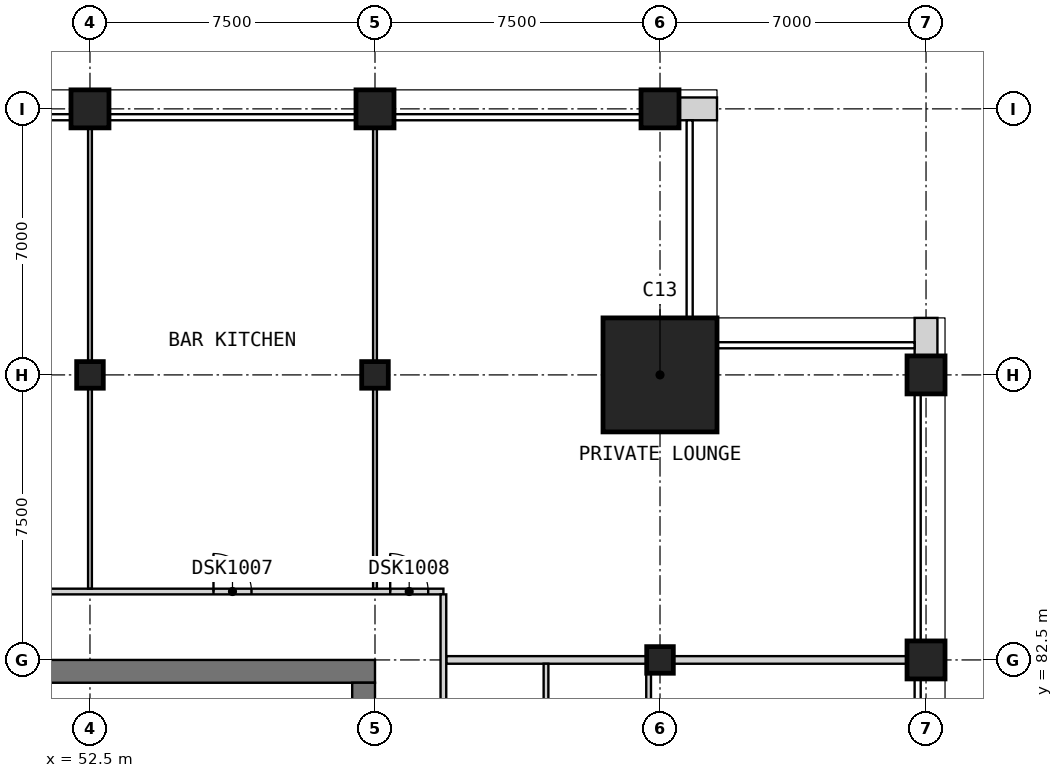
"""IFC4 building model, lengths in metres.
Left out: names, types, materials, properties, quantities, classifications, styles, units other than length and angle.
Written with IfcOpenShell. Run it as: python <this file> out.ifc"""

import sys

from ifc_helpers import new_model, si_unit, direction, frame, frame_2d, origin, origin_2d, place, context, subcontext, project, spatial, rectangle, extrude, element, fill, save


model = new_model("IFC4")
c1 = context("Model", 3, precision=1e-05, world=origin(), true_north=direction((0.0, 1.0)))
c2 = subcontext(c1, "Body", "Model", "MODEL_VIEW")
j1 = project(units=[si_unit("LENGTHUNIT", "METRE"), si_unit("PLANEANGLEUNIT", "RADIAN")], contexts=[c1])
p1 = place(None, origin())
s1 = spatial("IfcSite", under=j1, at=p1, CompositionType="ELEMENT")
p2 = place(p1, origin())
s2 = spatial("IfcBuilding", under=s1, at=p2, CompositionType="ELEMENT")
p3 = place(p2, frame((0.0, 0.0, 297.7)))
s3 = spatial("IfcBuildingStorey", under=s2, at=p3, CompositionType="ELEMENT", Elevation=297.7)
p4 = place(p3, frame((52.5, 90.0, 0.0), z_axis=(0.0, 0.0, 1.0), x_axis=(1.0, 0.0, 0.0)))
e1 = element("IfcColumn", 1, at=p4, inside=s3, PredefinedType="COLUMN", context=c2, shape_type="SweptSolid", body=[
    extrude(rectangle(XDim=0.7, YDim=0.7, at=origin_2d()), origin(), (0.0, 0.0, 1.0), 5.0),
])
p5 = place(p3, frame((52.5, 97.0, 0.0), z_axis=(0.0, 0.0, 1.0), x_axis=(1.0, 0.0, 0.0)))
e2 = element("IfcColumn", 2, at=p5, inside=s3, PredefinedType="COLUMN", context=c2, shape_type="SweptSolid", body=[
    extrude(rectangle(XDim=1.0, YDim=1.0, at=origin_2d()), origin(), (0.0, 0.0, 1.0), 5.0),
])
p6 = place(p3, frame((60.0, 90.0, 0.0), z_axis=(0.0, 0.0, 1.0), x_axis=(1.0, 0.0, 0.0)))
e3 = element("IfcColumn", 3, at=p6, inside=s3, PredefinedType="COLUMN", context=c2, shape_type="SweptSolid", body=[
    extrude(rectangle(XDim=0.7, YDim=0.7, at=origin_2d()), origin(), (0.0, 0.0, 1.0), 5.0),
])
p7 = place(p3, frame((60.0, 97.0, 0.0), z_axis=(0.0, 0.0, 1.0), x_axis=(1.0, 0.0, 0.0)))
e4 = element("IfcColumn", 4, at=p7, inside=s3, PredefinedType="COLUMN", context=c2, shape_type="SweptSolid", body=[
    extrude(rectangle(XDim=1.0, YDim=1.0, at=origin_2d()), origin(), (0.0, 0.0, 1.0), 5.0),
])
p8 = place(p3, frame((67.5, 82.5, 0.0), z_axis=(0.0, 0.0, 1.0), x_axis=(1.0, 0.0, 0.0)))
e5 = element("IfcColumn", 5, at=p8, inside=s3, PredefinedType="COLUMN", context=c2, shape_type="SweptSolid", body=[
    extrude(rectangle(XDim=0.7, YDim=0.7, at=origin_2d()), origin(), (0.0, 0.0, 1.0), 5.0),
])
for number, where, z_axis, x_axis in (
    (6, (67.5, 97.0, 0.0), (0.0, 0.0, 1.0), (1.0, 0.0, 0.0)),
    (7, (74.5, 82.5, 0.0), (0.0, 0.0, 1.0), (1.0, 0.0, 0.0)),
    (8, (74.5, 90.0, 0.0), (0.0, 0.0, 1.0), (1.0, 0.0, 0.0)),
):
    element("IfcColumn", number, at=place(p3, frame(where, z_axis=z_axis, x_axis=x_axis)), inside=s3, PredefinedType="COLUMN", context=c2, shape_type="SweptSolid", body=[
        extrude(rectangle(XDim=1.0, YDim=1.0, at=origin_2d()), origin(), (0.0, 0.0, 1.0), 5.0),
    ])
p9 = place(p3, frame((67.5, 90.0, 0.0), z_axis=(0.0, 0.0, 1.0), x_axis=(1.0, 0.0, 0.0)))
e9 = element("IfcColumn", 9, at=p9, inside=s3, PredefinedType="COLUMN", context=c2, shape_type="SweptSolid", body=[
    extrude(rectangle(XDim=3.0, YDim=3.0, at=origin_2d()), origin(), (0.0, 0.0, 1.0), 5.0),
])
p10 = place(p3, frame((30.0, 82.2, 0.0), z_axis=(0.0, 0.0, 1.0), x_axis=(1.0, 0.0, 0.0)))
e10 = element("IfcWall", 10, at=p10, inside=s3, PredefinedType="SHEAR", context=c2, shape_type="SweptSolid", body=[
    extrude(rectangle(XDim=30.0, YDim=0.6, at=frame_2d((15.0, 0.0))), origin(), (0.0, 0.0, 1.0), 5.0),
])
p11 = place(p3, frame((59.7, 60.6, 0.0), z_axis=(0.0, 0.0, 1.0), x_axis=(0.0, 1.0, 0.0)))
e11 = element("IfcWall", 11, at=p11, inside=s3, PredefinedType="SHEAR", context=c2, shape_type="SweptSolid", body=[
    extrude(rectangle(XDim=21.3, YDim=0.6, at=frame_2d((10.65, 0.0))), origin(), (0.0, 0.0, 1.0), 5.0),
])
p12 = place(p11, frame((14.9, 0.0, 0.0)))
e12 = element("IfcOpeningElement", 12, at=p12, cuts=e11, PredefinedType="OPENING", context=c2, shape_type="SweptSolid", body=[
    extrude(rectangle(XDim=1.8, YDim=2.1, at=frame_2d((0.9, 1.05))), frame((0.0, 0.31, 0.0), z_axis=(0.0, -1.0, 0.0), x_axis=(1.0, 0.0, 0.0)), (0.0, 0.0, 1.0), 0.62),
])
for number, where, z_axis, x_axis in (
    (13, (74.5, 90.5, 0.0), (0.0, 0.0, 1.0), (0.0, 1.0, 0.0)),
    (14, (69.0, 97.0, 0.0), (0.0, 0.0, 1.0), (-1.0, 0.0, 0.0)),
):
    element("IfcWall", number, at=place(p3, frame(where, z_axis=z_axis, x_axis=x_axis)), inside=s3, PredefinedType="SOLIDWALL", context=c2, shape_type="SweptSolid", body=[
        extrude(rectangle(XDim=1.0, YDim=0.6, at=frame_2d((0.5, 0.0))), origin(), (0.0, 0.0, 1.0), 4.7),
    ])
p13 = place(p3, frame((61.875, 82.5, 0.0), z_axis=(0.0, 0.0, 1.0), x_axis=(1.0, 0.0, 0.0)))
e15 = element("IfcWall", 15, at=p13, inside=s3, PredefinedType="PARTITIONING", context=c2, shape_type="SweptSolid", body=[
    extrude(rectangle(XDim=13.125, YDim=0.2, at=frame_2d((6.562, 0.0))), origin(), (0.0, 0.0, 1.0), 4.7),
])
p14 = place(p3, frame((33.75, 84.3, 0.0), z_axis=(0.0, 0.0, 1.0), x_axis=(1.0, 0.0, 0.0)))
e16 = element("IfcWall", 16, at=p14, inside=s3, PredefinedType="PARTITIONING", context=c2, shape_type="SweptSolid", body=[
    extrude(rectangle(XDim=28.05, YDim=0.15, at=frame_2d((14.025, 0.0))), origin(), (0.0, 0.0, 1.0), 4.7),
])
p15 = place(p14, frame((0.975, 0.0, 0.0)))
e17 = element("IfcOpeningElement", 17, at=p15, cuts=e16, PredefinedType="OPENING", context=c2, shape_type="SweptSolid", body=[
    extrude(rectangle(XDim=1.8, YDim=2.1, at=frame_2d((0.9, 1.05))), frame((0.0, 0.085, 0.0), z_axis=(0.0, -1.0, 0.0), x_axis=(1.0, 0.0, 0.0)), (0.0, 0.0, 1.0), 0.17),
])
p16 = place(p14, frame((10.35, 0.0, 0.0)))
e18 = element("IfcOpeningElement", 18, at=p16, cuts=e16, PredefinedType="OPENING", context=c2, shape_type="SweptSolid", body=[
    extrude(rectangle(XDim=1.8, YDim=2.1, at=frame_2d((0.9, 1.05))), frame((0.0, 0.085, 0.0), z_axis=(0.0, -1.0, 0.0), x_axis=(1.0, 0.0, 0.0)), (0.0, 0.0, 1.0), 0.17),
])
p17 = place(p14, frame((22.0, 0.0, 0.0)))
e19 = element("IfcOpeningElement", 19, at=p17, cuts=e16, PredefinedType="OPENING", context=c2, shape_type="SweptSolid", body=[
    extrude(rectangle(XDim=1.0, YDim=2.1, at=frame_2d((0.5, 1.05))), frame((0.0, 0.085, 0.0), z_axis=(0.0, -1.0, 0.0), x_axis=(1.0, 0.0, 0.0)), (0.0, 0.0, 1.0), 0.17),
])
p18 = place(p14, frame((26.65, 0.0, 0.0)))
e20 = element("IfcOpeningElement", 20, at=p18, cuts=e16, PredefinedType="OPENING", context=c2, shape_type="SweptSolid", body=[
    extrude(rectangle(XDim=1.0, YDim=2.1, at=frame_2d((0.5, 1.05))), frame((0.0, 0.085, 0.0), z_axis=(0.0, -1.0, 0.0), x_axis=(1.0, 0.0, 0.0)), (0.0, 0.0, 1.0), 0.17),
])
p19 = place(p3, frame((61.8, 58.275, 0.0), z_axis=(0.0, 0.0, 1.0), x_axis=(0.0, 1.0, 0.0)))
e21 = element("IfcWall", 21, at=p19, inside=s3, PredefinedType="PARTITIONING", context=c2, shape_type="SweptSolid", body=[
    extrude(rectangle(XDim=25.95, YDim=0.15, at=frame_2d((12.975, 0.0))), origin(), (0.0, 0.0, 1.0), 4.7),
])
p20 = place(p19, frame((3.1, 0.0, 0.0)))
e22 = element("IfcOpeningElement", 22, at=p20, cuts=e21, PredefinedType="OPENING", context=c2, shape_type="SweptSolid", body=[
    extrude(rectangle(XDim=1.0, YDim=2.1, at=frame_2d((0.5, 1.05))), frame((0.0, 0.085, 0.0), z_axis=(0.0, -1.0, 0.0), x_axis=(1.0, 0.0, 0.0)), (0.0, 0.0, 1.0), 0.17),
])
p21 = place(p19, frame((10.6, 0.0, 0.0)))
e23 = element("IfcOpeningElement", 23, at=p21, cuts=e21, PredefinedType="OPENING", context=c2, shape_type="SweptSolid", body=[
    extrude(rectangle(XDim=1.0, YDim=2.1, at=frame_2d((0.5, 1.05))), frame((0.0, 0.085, 0.0), z_axis=(0.0, -1.0, 0.0), x_axis=(1.0, 0.0, 0.0)), (0.0, 0.0, 1.0), 0.17),
])
p22 = place(p19, frame((18.15, 0.0, 0.0)))
e24 = element("IfcOpeningElement", 24, at=p22, cuts=e21, PredefinedType="OPENING", context=c2, shape_type="SweptSolid", body=[
    extrude(rectangle(XDim=0.9, YDim=2.1, at=frame_2d((0.45, 1.05))), frame((0.0, 0.085, 0.0), z_axis=(0.0, -1.0, 0.0), x_axis=(1.0, 0.0, 0.0)), (0.0, 0.0, 1.0), 0.17),
])
for number, where, z_axis, x_axis in (
    (25, (52.5, 84.375, 0.0), (0.0, 0.0, 1.0), (0.0, 1.0, 0.0)),
    (26, (60.0, 84.375, 0.0), (0.0, 0.0, 1.0), (0.0, 1.0, 0.0)),
):
    element("IfcWall", number, at=place(p3, frame(where, z_axis=z_axis, x_axis=x_axis)), inside=s3, PredefinedType="PARTITIONING", context=c2, shape_type="SweptSolid", body=[
        extrude(rectangle(XDim=13.125, YDim=0.1, at=frame_2d((6.562, 0.0))), origin(), (0.0, 0.0, 1.0), 4.7),
    ])
for number, where, z_axis, x_axis in (
    (27, (64.5, 78.812, 0.0), (0.0, 0.0, 1.0), (0.0, 1.0, 0.0)),
    (28, (67.2, 78.812, 0.0), (0.0, 0.0, 1.0), (0.0, 1.0, 0.0)),
):
    element("IfcWall", number, at=place(p3, frame(where, z_axis=z_axis, x_axis=x_axis)), inside=s3, PredefinedType="PARTITIONING", context=c2, shape_type="SweptSolid", body=[
        extrude(rectangle(XDim=3.587, YDim=0.125, at=frame_2d((1.794, 0.0))), origin(), (0.0, 0.0, 1.0), 4.7),
    ])
p23 = place(p17, origin())
e29 = element("IfcDoor", 29, at=p23, inside=s3, OperationType="SINGLE_SWING_LEFT", PredefinedType="DOOR", context=c2, shape_type="SweptSolid", body=[
    extrude(rectangle(XDim=1.0, YDim=2.1, at=frame_2d((0.5, 1.05))), frame((0.0, 0.025, 0.0), z_axis=(0.0, -1.0, 0.0), x_axis=(1.0, 0.0, 0.0)), (0.0, 0.0, 1.0), 0.05),
])
fill(e19, e29)
p24 = place(p18, origin())
e30 = element("IfcDoor", 30, at=p24, inside=s3, OperationType="SINGLE_SWING_LEFT", PredefinedType="DOOR", context=c2, shape_type="SweptSolid", body=[
    extrude(rectangle(XDim=1.0, YDim=2.1, at=frame_2d((0.5, 1.05))), frame((0.0, 0.025, 0.0), z_axis=(0.0, -1.0, 0.0), x_axis=(1.0, 0.0, 0.0)), (0.0, 0.0, 1.0), 0.05),
])
fill(e20, e30)
save(model, sys.argv[1])
